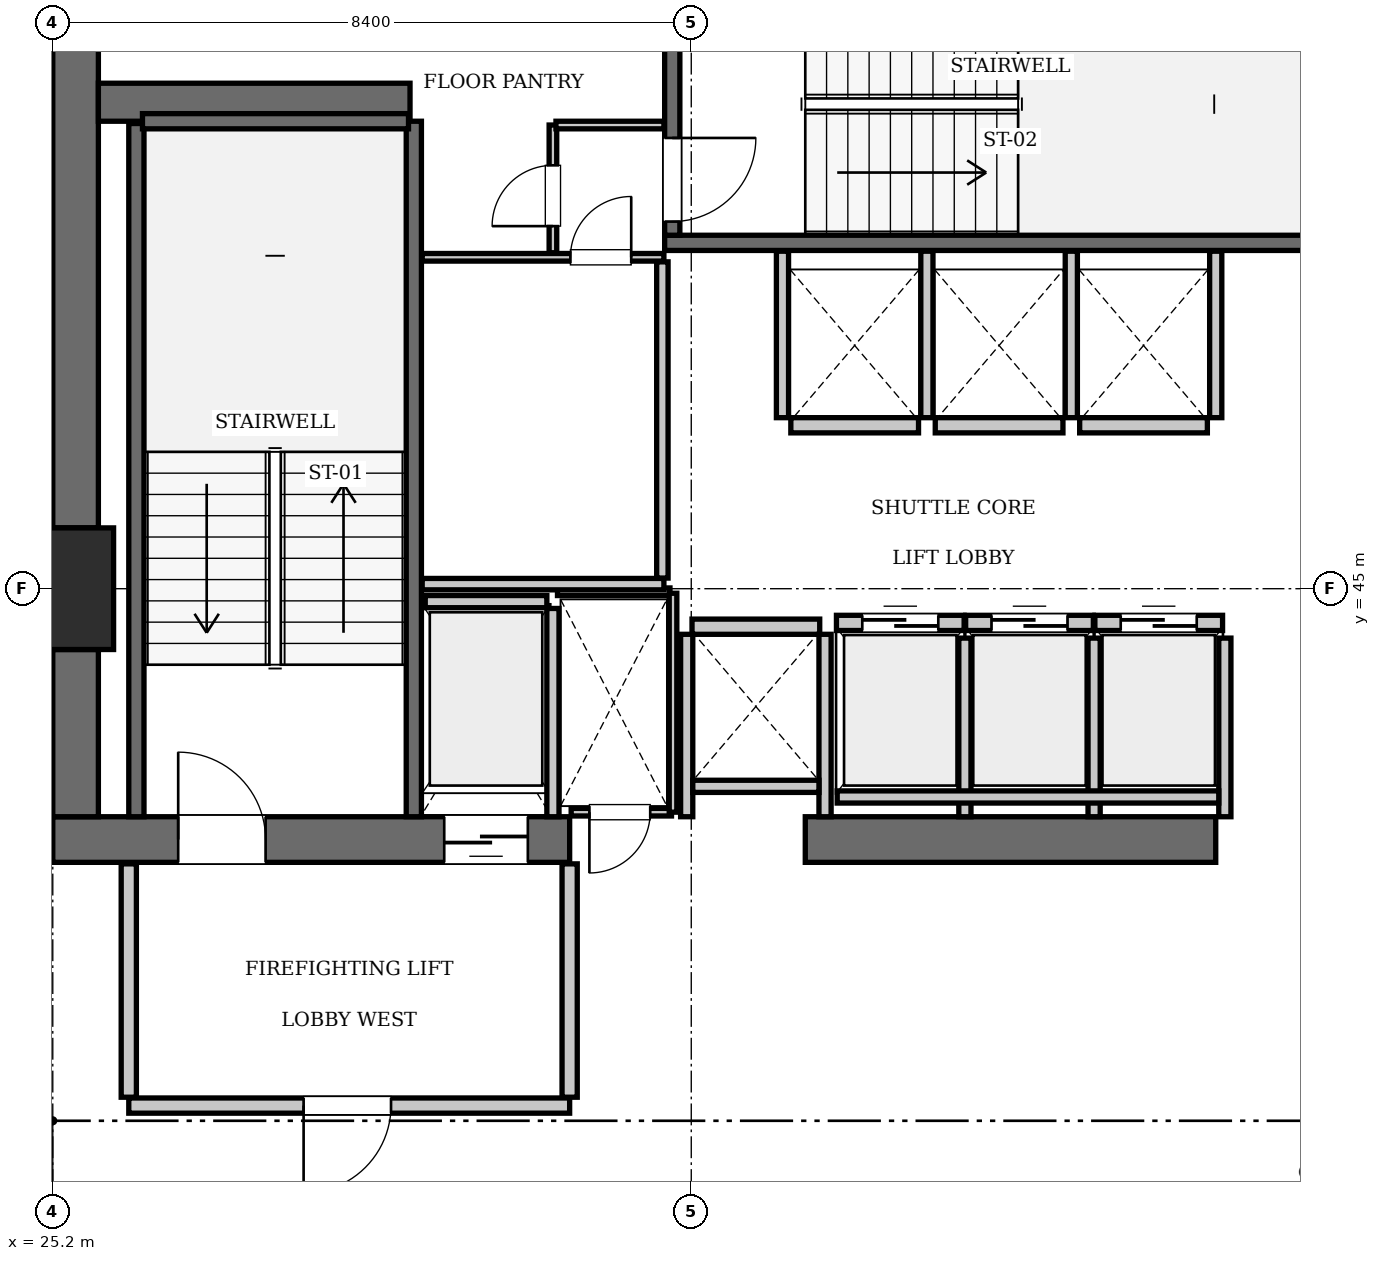
"""IFC4 building model, lengths in metres.
Left out: names, types, materials, properties, quantities, classifications, styles, units other than length and angle.
Written with IfcOpenShell. Run it as: python <this file> out.ifc"""

import sys

from ifc_helpers import new_model, si_unit, direction, frame, frame_2d, origin, origin_2d, place, context, subcontext, project, spatial, rectangle, extrude, element, fill, save


model = new_model("IFC4")
c1 = context("Model", 3, precision=1e-05, world=origin(), true_north=direction((0.0, 1.0)))
c2 = subcontext(c1, "Body", "Model", "MODEL_VIEW")
j1 = project(units=[si_unit("LENGTHUNIT", "METRE"), si_unit("PLANEANGLEUNIT", "RADIAN")], contexts=[c1])
p1 = place(None, origin())
s1 = spatial("IfcSite", under=j1, at=p1, CompositionType="ELEMENT")
p2 = place(p1, origin())
s2 = spatial("IfcBuilding", under=s1, at=p2, CompositionType="ELEMENT")
p3 = place(p2, frame((0.0, 0.0, 285.6)))
s3 = spatial("IfcBuildingStorey", under=s2, at=p3, CompositionType="ELEMENT", Elevation=285.6)
p4 = place(p3, frame((25.2, 45.0, 0.0), z_axis=(0.0, 0.0, 1.0), x_axis=(1.0, 0.0, 0.0)))
e1 = element("IfcColumn", 1, at=p4, inside=s3, PredefinedType="COLUMN", context=c2, shape_type="SweptSolid", body=[
    extrude(rectangle(XDim=1.6, YDim=1.6, at=origin_2d()), origin(), (0.0, 0.0, 1.0), 3.85),
])
p5 = place(p3, frame((25.2, 41.7, 0.0), z_axis=(0.0, 0.0, 1.0), x_axis=(1.0, 0.0, 0.0)))
e2 = element("IfcWall", 2, at=p5, inside=s3, PredefinedType="SHEAR", context=c2, shape_type="SweptSolid", body=[
    extrude(rectangle(XDim=6.8, YDim=0.6, at=frame_2d((3.4, 0.0))), origin(), (0.0, 0.0, 1.0), 3.85),
])
p6 = place(p5, frame((1.65, 0.0, 0.0)))
e3 = element("IfcOpeningElement", 3, at=p6, cuts=e2, PredefinedType="OPENING", context=c2, shape_type="SweptSolid", body=[
    extrude(rectangle(XDim=1.15, YDim=2.15, at=frame_2d((0.575, 1.075))), frame((0.0, 0.31, 0.0), z_axis=(0.0, -1.0, 0.0), x_axis=(1.0, 0.0, 0.0)), (0.0, 0.0, 1.0), 0.62),
])
p7 = place(p5, frame((5.15, 0.0, 0.0)))
e4 = element("IfcOpeningElement", 4, at=p7, cuts=e2, PredefinedType="OPENING", context=c2, shape_type="SweptSolid", body=[
    extrude(rectangle(XDim=1.1, YDim=2.2, at=frame_2d((0.55, 1.1))), frame((0.0, 0.31, 0.0), z_axis=(0.0, -1.0, 0.0), x_axis=(1.0, 0.0, 0.0)), (0.0, 0.0, 1.0), 0.62),
])
p8 = place(p3, frame((35.1, 41.7, 0.0), z_axis=(0.0, 0.0, 1.0), x_axis=(1.0, 0.0, 0.0)))
e5 = element("IfcWall", 5, at=p8, inside=s3, PredefinedType="SHEAR", context=c2, shape_type="SweptSolid", body=[
    extrude(rectangle(XDim=5.4, YDim=0.6, at=frame_2d((2.7, 0.0))), origin(), (0.0, 0.0, 1.0), 3.85),
])
p9 = place(p3, frame((25.5, 42.0, 0.0), z_axis=(0.0, 0.0, 1.0), x_axis=(0.0, 1.0, 0.0)))
e6 = element("IfcWall", 6, at=p9, inside=s3, PredefinedType="SHEAR", context=c2, shape_type="SweptSolid", body=[
    extrude(rectangle(XDim=2.2, YDim=0.6, at=frame_2d((1.1, 0.0))), origin(), (0.0, 0.0, 1.0), 3.85),
])
p10 = place(p3, frame((25.5, 45.8, 0.0), z_axis=(0.0, 0.0, 1.0), x_axis=(0.0, 1.0, 0.0)))
e7 = element("IfcWall", 7, at=p10, inside=s3, PredefinedType="SHEAR", context=c2, shape_type="SweptSolid", body=[
    extrude(rectangle(XDim=7.6, YDim=0.6, at=frame_2d((3.8, 0.0))), origin(), (0.0, 0.0, 1.0), 3.85),
])
p11 = place(p3, frame((25.8, 51.4, 0.0), z_axis=(0.0, 0.0, 1.0), x_axis=(1.0, 0.0, 0.0)))
e8 = element("IfcWall", 8, at=p11, inside=s3, PredefinedType="SHEAR", context=c2, shape_type="SweptSolid", body=[
    extrude(rectangle(XDim=4.1, YDim=0.5, at=frame_2d((2.05, 0.0))), origin(), (0.0, 0.0, 1.0), 3.85),
])
p12 = place(p3, frame((29.95, 42.0, 0.0), z_axis=(0.0, 0.0, 1.0), x_axis=(0.0, 1.0, 0.0)))
e9 = element("IfcWall", 9, at=p12, inside=s3, PredefinedType="SOLIDWALL", context=c2, shape_type="SweptSolid", body=[
    extrude(rectangle(XDim=9.15, YDim=0.2, at=frame_2d((4.575, 0.0))), origin(), (0.0, 0.0, 1.0), 3.61),
])
p13 = place(p3, frame((26.3, 42.0, 0.0), z_axis=(0.0, 0.0, 1.0), x_axis=(0.0, 1.0, 0.0)))
e10 = element("IfcWall", 10, at=p13, inside=s3, PredefinedType="SOLIDWALL", context=c2, shape_type="SweptSolid", body=[
    extrude(rectangle(XDim=9.12, YDim=0.2, at=frame_2d((4.56, 0.0))), origin(), (0.0, 0.0, 1.0), 3.61),
])
p14 = place(p3, frame((26.38, 51.15, 0.0), z_axis=(0.0, 0.0, 1.0), x_axis=(1.0, 0.0, 0.0)))
e11 = element("IfcWall", 11, at=p14, inside=s3, PredefinedType="SOLIDWALL", context=c2, shape_type="SweptSolid", body=[
    extrude(rectangle(XDim=3.5, YDim=0.2, at=frame_2d((1.75, 0.0))), origin(), (0.0, 0.0, 1.0), 3.61),
])
p15 = place(p3, frame((33.25, 49.55, 0.0), z_axis=(0.0, 0.0, 1.0), x_axis=(1.0, 0.0, 0.0)))
e12 = element("IfcWall", 12, at=p15, inside=s3, PredefinedType="SOLIDWALL", context=c2, shape_type="SweptSolid", body=[
    extrude(rectangle(XDim=9.1, YDim=0.2, at=frame_2d((4.55, 0.0))), origin(), (0.0, 0.0, 1.0), 3.61),
])
p16 = place(p3, frame((33.35, 49.65, 0.0), z_axis=(0.0, 0.0, 1.0), x_axis=(0.0, 1.0, 0.0)))
e13 = element("IfcWall", 13, at=p16, inside=s3, PredefinedType="SOLIDWALL", context=c2, shape_type="SweptSolid", body=[
    extrude(rectangle(XDim=3.75, YDim=0.2, at=frame_2d((1.875, 0.0))), origin(), (0.0, 0.0, 1.0), 3.61),
])
p17 = place(p16, frame((0.18, 0.0, 0.0)))
e14 = element("IfcOpeningElement", 14, at=p17, cuts=e13, PredefinedType="OPENING", context=c2, shape_type="SweptSolid", body=[
    extrude(rectangle(XDim=1.1, YDim=2.15, at=frame_2d((0.55, 1.075))), frame((0.0, 0.11, 0.0), z_axis=(0.0, -1.0, 0.0), x_axis=(1.0, 0.0, 0.0)), (0.0, 0.0, 1.0), 0.22),
])
p18 = place(p3, frame((35.51, 44.55, 0.0), z_axis=(0.0, 0.0, 1.0), x_axis=(1.0, 0.0, 0.0)))
e15 = element("IfcWall", 15, at=p18, inside=s3, PredefinedType="SOLIDWALL", context=c2, shape_type="SweptSolid", body=[
    extrude(rectangle(XDim=1.68, YDim=0.2, at=frame_2d((0.84, 0.0))), origin(), (0.0, 0.0, 1.0), 3.61),
])
p19 = place(p18, frame((0.34, 0.0, 0.0)))
e16 = element("IfcOpeningElement", 16, at=p19, cuts=e15, PredefinedType="OPENING", context=c2, shape_type="SweptSolid", body=[
    extrude(rectangle(XDim=1.0, YDim=2.15, at=frame_2d((0.5, 1.075))), frame((0.0, 0.11, 0.0), z_axis=(0.0, -1.0, 0.0), x_axis=(1.0, 0.0, 0.0)), (0.0, 0.0, 1.0), 0.22),
])
p20 = place(p3, frame((37.21, 44.55, 0.0), z_axis=(0.0, 0.0, 1.0), x_axis=(1.0, 0.0, 0.0)))
e17 = element("IfcWall", 17, at=p20, inside=s3, PredefinedType="SOLIDWALL", context=c2, shape_type="SweptSolid", body=[
    extrude(rectangle(XDim=1.68, YDim=0.2, at=frame_2d((0.84, 0.0))), origin(), (0.0, 0.0, 1.0), 3.61),
])
p21 = place(p20, frame((0.34, 0.0, 0.0)))
e18 = element("IfcOpeningElement", 18, at=p21, cuts=e17, PredefinedType="OPENING", context=c2, shape_type="SweptSolid", body=[
    extrude(rectangle(XDim=1.0, YDim=2.15, at=frame_2d((0.5, 1.075))), frame((0.0, 0.11, 0.0), z_axis=(0.0, -1.0, 0.0), x_axis=(1.0, 0.0, 0.0)), (0.0, 0.0, 1.0), 0.22),
])
p22 = place(p3, frame((38.91, 44.55, 0.0), z_axis=(0.0, 0.0, 1.0), x_axis=(1.0, 0.0, 0.0)))
e19 = element("IfcWall", 19, at=p22, inside=s3, PredefinedType="SOLIDWALL", context=c2, shape_type="SweptSolid", body=[
    extrude(rectangle(XDim=1.68, YDim=0.2, at=frame_2d((0.84, 0.0))), origin(), (0.0, 0.0, 1.0), 3.61),
])
p23 = place(p22, frame((0.34, 0.0, 0.0)))
e20 = element("IfcOpeningElement", 20, at=p23, cuts=e19, PredefinedType="OPENING", context=c2, shape_type="SweptSolid", body=[
    extrude(rectangle(XDim=1.0, YDim=2.15, at=frame_2d((0.5, 1.075))), frame((0.0, 0.11, 0.0), z_axis=(0.0, -1.0, 0.0), x_axis=(1.0, 0.0, 0.0)), (0.0, 0.0, 1.0), 0.22),
])
p24 = place(p3, frame((34.91, 47.15, 0.0), z_axis=(0.0, 0.0, 1.0), x_axis=(1.0, 0.0, 0.0)))
e21 = element("IfcWall", 21, at=p24, inside=s3, PredefinedType="SOLIDWALL", context=c2, shape_type="SweptSolid", body=[
    extrude(rectangle(XDim=1.68, YDim=0.2, at=frame_2d((0.84, 0.0))), origin(), (0.0, 0.0, 1.0), 3.61),
])
for number, where, z_axis, x_axis in (
    (22, (36.81, 47.15, 0.0), (0.0, 0.0, 1.0), (1.0, 0.0, 0.0)),
    (23, (38.71, 47.15, 0.0), (0.0, 0.0, 1.0), (1.0, 0.0, 0.0)),
    (24, (33.61, 44.5, 0.0), (0.0, 0.0, 1.0), (1.0, 0.0, 0.0)),
):
    element("IfcWall", number, at=place(p3, frame(where, z_axis=z_axis, x_axis=x_axis)), inside=s3, PredefinedType="SOLIDWALL", context=c2, shape_type="SweptSolid", body=[
        extrude(rectangle(XDim=1.68, YDim=0.2, at=frame_2d((0.84, 0.0))), origin(), (0.0, 0.0, 1.0), 3.61),
    ])
p25 = place(p3, frame((30.1, 44.83, 0.0), z_axis=(0.0, 0.0, 1.0), x_axis=(1.0, 0.0, 0.0)))
e25 = element("IfcWall", 25, at=p25, inside=s3, PredefinedType="SOLIDWALL", context=c2, shape_type="SweptSolid", body=[
    extrude(rectangle(XDim=1.6, YDim=0.16, at=frame_2d((0.8, 0.0))), origin(), (0.0, 0.0, 1.0), 3.61),
])
p26 = place(p3, frame((31.78, 42.0, 0.0), z_axis=(0.0, 0.0, 1.0), x_axis=(0.0, 1.0, 0.0)))
e26 = element("IfcWall", 26, at=p26, inside=s3, PredefinedType="SOLIDWALL", context=c2, shape_type="SweptSolid", body=[
    extrude(rectangle(XDim=2.74, YDim=0.16, at=frame_2d((1.37, 0.0))), origin(), (0.0, 0.0, 1.0), 3.61),
])
for number, where, z_axis, x_axis in (
    (27, (37.2, 42.0, 0.0), (0.0, 0.0, 1.0), (0.0, 1.0, 0.0)),
    (28, (38.9, 42.0, 0.0), (0.0, 0.0, 1.0), (0.0, 1.0, 0.0)),
    (29, (40.62, 42.0, 0.0), (0.0, 0.0, 1.0), (0.0, 1.0, 0.0)),
):
    element("IfcWall", number, at=place(p3, frame(where, z_axis=z_axis, x_axis=x_axis)), inside=s3, PredefinedType="SOLIDWALL", context=c2, shape_type="SweptSolid", body=[
        extrude(rectangle(XDim=2.35, YDim=0.16, at=frame_2d((1.175, 0.0))), origin(), (0.0, 0.0, 1.0), 3.61),
    ])
p27 = place(p3, frame((35.52, 42.26, 0.0), z_axis=(0.0, 0.0, 1.0), x_axis=(1.0, 0.0, 0.0)))
e30 = element("IfcWall", 30, at=p27, inside=s3, PredefinedType="SOLIDWALL", context=c2, shape_type="SweptSolid", body=[
    extrude(rectangle(XDim=5.02, YDim=0.16, at=frame_2d((2.51, 0.0))), origin(), (0.0, 0.0, 1.0), 3.61),
])
for number, where, z_axis, x_axis in (
    (31, (34.8, 47.25, 0.0), (0.0, 0.0, 1.0), (0.0, 1.0, 0.0)),
    (32, (36.7, 47.25, 0.0), (0.0, 0.0, 1.0), (0.0, 1.0, 0.0)),
    (33, (38.6, 47.25, 0.0), (0.0, 0.0, 1.0), (0.0, 1.0, 0.0)),
    (34, (40.5, 47.25, 0.0), (0.0, 0.0, 1.0), (0.0, 1.0, 0.0)),
):
    element("IfcWall", number, at=place(p3, frame(where, z_axis=z_axis, x_axis=x_axis)), inside=s3, PredefinedType="SOLIDWALL", context=c2, shape_type="SweptSolid", body=[
        extrude(rectangle(XDim=2.19, YDim=0.16, at=frame_2d((1.095, 0.0))), origin(), (0.0, 0.0, 1.0), 3.61),
    ])
for number, where, z_axis, x_axis in (
    (35, (33.54, 42.0, 0.0), (0.0, 0.0, 1.0), (0.0, 1.0, 0.0)),
    (36, (35.36, 42.0, 0.0), (0.0, 0.0, 1.0), (0.0, 1.0, 0.0)),
):
    element("IfcWall", number, at=place(p3, frame(where, z_axis=z_axis, x_axis=x_axis)), inside=s3, PredefinedType="SOLIDWALL", context=c2, shape_type="SweptSolid", body=[
        extrude(rectangle(XDim=2.4, YDim=0.16, at=frame_2d((1.2, 0.0))), origin(), (0.0, 0.0, 1.0), 3.61),
    ])
p28 = place(p3, frame((33.62, 42.4, 0.0), z_axis=(0.0, 0.0, 1.0), x_axis=(1.0, 0.0, 0.0)))
e37 = element("IfcWall", 37, at=p28, inside=s3, PredefinedType="SOLIDWALL", context=c2, shape_type="SweptSolid", body=[
    extrude(rectangle(XDim=1.66, YDim=0.16, at=frame_2d((0.83, 0.0))), origin(), (0.0, 0.0, 1.0), 3.61),
])
p29 = place(p3, frame((26.2, 38.2, 0.0), z_axis=(0.0, 0.0, 1.0), x_axis=(1.0, 0.0, 0.0)))
e38 = element("IfcWall", 38, at=p29, inside=s3, PredefinedType="PARTITIONING", context=c2, shape_type="SweptSolid", body=[
    extrude(rectangle(XDim=5.8, YDim=0.2, at=frame_2d((2.9, 0.0))), origin(), (0.0, 0.0, 1.0), 3.61),
])
p30 = place(p29, frame((2.3, 0.0, 0.0)))
e39 = element("IfcOpeningElement", 39, at=p30, cuts=e38, PredefinedType="OPENING", context=c2, shape_type="SweptSolid", body=[
    extrude(rectangle(XDim=1.15, YDim=2.15, at=frame_2d((0.575, 1.075))), frame((0.0, 0.11, 0.0), z_axis=(0.0, -1.0, 0.0), x_axis=(1.0, 0.0, 0.0)), (0.0, 0.0, 1.0), 0.22),
])
for number, where, z_axis, x_axis in (
    (40, (26.2, 38.31, 0.0), (0.0, 0.0, 1.0), (0.0, 1.0, 0.0)),
    (41, (32.0, 38.31, 0.0), (0.0, 0.0, 1.0), (0.0, 1.0, 0.0)),
):
    element("IfcWall", number, at=place(p3, frame(where, z_axis=z_axis, x_axis=x_axis)), inside=s3, PredefinedType="PARTITIONING", context=c2, shape_type="SweptSolid", body=[
        extrude(rectangle(XDim=3.07, YDim=0.2, at=frame_2d((1.535, 0.0))), origin(), (0.0, 0.0, 1.0), 3.61),
    ])
p31 = place(p3, frame((32.02, 42.06, 0.0), z_axis=(0.0, 0.0, 1.0), x_axis=(1.0, 0.0, 0.0)))
e42 = element("IfcWall", 42, at=p31, inside=s3, PredefinedType="PARTITIONING", context=c2, shape_type="SweptSolid", body=[
    extrude(rectangle(XDim=1.32, YDim=0.1, at=frame_2d((0.66, 0.0))), origin(), (0.0, 0.0, 1.0), 3.61),
])
p32 = place(p31, frame((0.24, 0.0, 0.0)))
e43 = element("IfcOpeningElement", 43, at=p32, cuts=e42, PredefinedType="OPENING", context=c2, shape_type="SweptSolid", body=[
    extrude(rectangle(XDim=0.8, YDim=2.05, at=frame_2d((0.4, 1.025))), frame((0.0, 0.06, 0.0), z_axis=(0.0, -1.0, 0.0), x_axis=(1.0, 0.0, 0.0)), (0.0, 0.0, 1.0), 0.12),
])
p33 = place(p3, frame((31.84, 44.96, 0.0), z_axis=(0.0, 0.0, 1.0), x_axis=(1.0, 0.0, 0.0)))
e44 = element("IfcWall", 44, at=p33, inside=s3, PredefinedType="PARTITIONING", context=c2, shape_type="SweptSolid", body=[
    extrude(rectangle(XDim=1.48, YDim=0.1, at=frame_2d((0.74, 0.0))), origin(), (0.0, 0.0, 1.0), 3.61),
])
p34 = place(p3, frame((33.36, 42.06, 0.0), z_axis=(0.0, 0.0, 1.0), x_axis=(0.0, 1.0, 0.0)))
e45 = element("IfcWall", 45, at=p34, inside=s3, PredefinedType="PARTITIONING", context=c2, shape_type="SweptSolid", body=[
    extrude(rectangle(XDim=2.88, YDim=0.1, at=frame_2d((1.44, 0.0))), origin(), (0.0, 0.0, 1.0), 3.61),
])
p35 = place(p3, frame((30.06, 45.06, 0.0), z_axis=(0.0, 0.0, 1.0), x_axis=(1.0, 0.0, 0.0)))
e46 = element("IfcWall", 46, at=p35, inside=s3, PredefinedType="PARTITIONING", context=c2, shape_type="SweptSolid", body=[
    extrude(rectangle(XDim=3.18, YDim=0.15, at=frame_2d((1.59, 0.0))), origin(), (0.0, 0.0, 1.0), 3.61),
])
p36 = place(p3, frame((33.22, 45.14, 0.0), z_axis=(0.0, 0.0, 1.0), x_axis=(0.0, 1.0, 0.0)))
e47 = element("IfcWall", 47, at=p36, inside=s3, PredefinedType="PARTITIONING", context=c2, shape_type="SweptSolid", body=[
    extrude(rectangle(XDim=4.16, YDim=0.15, at=frame_2d((2.08, 0.0))), origin(), (0.0, 0.0, 1.0), 3.61),
])
p37 = place(p3, frame((30.06, 49.36, 0.0), z_axis=(0.0, 0.0, 1.0), x_axis=(1.0, 0.0, 0.0)))
e48 = element("IfcWall", 48, at=p37, inside=s3, PredefinedType="PARTITIONING", context=c2, shape_type="SweptSolid", body=[
    extrude(rectangle(XDim=3.18, YDim=0.1, at=frame_2d((1.59, 0.0))), origin(), (0.0, 0.0, 1.0), 3.61),
])
p38 = place(p37, frame((1.95, 0.0, 0.0)))
e49 = element("IfcOpeningElement", 49, at=p38, cuts=e48, PredefinedType="OPENING", context=c2, shape_type="SweptSolid", body=[
    extrude(rectangle(XDim=0.8, YDim=2.05, at=frame_2d((0.4, 1.025))), frame((0.0, 0.06, 0.0), z_axis=(0.0, -1.0, 0.0), x_axis=(1.0, 0.0, 0.0)), (0.0, 0.0, 1.0), 0.12),
])
p39 = place(p3, frame((31.78, 49.42, 0.0), z_axis=(0.0, 0.0, 1.0), x_axis=(0.0, 1.0, 0.0)))
e50 = element("IfcWall", 50, at=p39, inside=s3, PredefinedType="PARTITIONING", context=c2, shape_type="SweptSolid", body=[
    extrude(rectangle(XDim=1.68, YDim=0.1, at=frame_2d((0.84, 0.0))), origin(), (0.0, 0.0, 1.0), 3.61),
])
p40 = place(p39, frame((0.35, 0.0, 0.0)))
e51 = element("IfcOpeningElement", 51, at=p40, cuts=e50, PredefinedType="OPENING", context=c2, shape_type="SweptSolid", body=[
    extrude(rectangle(XDim=0.8, YDim=2.05, at=frame_2d((0.4, 1.025))), frame((0.0, 0.06, 0.0), z_axis=(0.0, -1.0, 0.0), x_axis=(1.0, 0.0, 0.0)), (0.0, 0.0, 1.0), 0.12),
])
p41 = place(p3, frame((31.82, 51.1, 0.0), z_axis=(0.0, 0.0, 1.0), x_axis=(1.0, 0.0, 0.0)))
e52 = element("IfcWall", 52, at=p41, inside=s3, PredefinedType="PARTITIONING", context=c2, shape_type="SweptSolid", body=[
    extrude(rectangle(XDim=1.42, YDim=0.1, at=frame_2d((0.71, 0.0))), origin(), (0.0, 0.0, 1.0), 3.61),
])
p42 = place(p6, origin())
e53 = element("IfcDoor", 53, at=p42, inside=s3, OperationType="SINGLE_SWING_LEFT", PredefinedType="DOOR", context=c2, shape_type="SweptSolid", body=[
    extrude(rectangle(XDim=1.15, YDim=2.15, at=frame_2d((0.575, 1.075))), frame((0.0, 0.025, 0.0), z_axis=(0.0, -1.0, 0.0), x_axis=(1.0, 0.0, 0.0)), (0.0, 0.0, 1.0), 0.05),
])
fill(e3, e53)
p43 = place(p17, frame((1.1, 0.0, 0.0), z_axis=(0.0, 0.0, 1.0), x_axis=(-1.0, 0.0, 0.0)))
e54 = element("IfcDoor", 54, at=p43, inside=s3, OperationType="SINGLE_SWING_LEFT", PredefinedType="DOOR", context=c2, shape_type="SweptSolid", body=[
    extrude(rectangle(XDim=1.1, YDim=2.15, at=frame_2d((0.55, 1.075))), frame((0.0, 0.025, 0.0), z_axis=(0.0, -1.0, 0.0), x_axis=(1.0, 0.0, 0.0)), (0.0, 0.0, 1.0), 0.05),
])
fill(e14, e54)
p44 = place(p19, origin())
e55 = element("IfcDoor", 55, at=p44, inside=s3, OperationType="SLIDING_TO_LEFT", PredefinedType="DOOR", context=c2, shape_type="SweptSolid", body=[
    extrude(rectangle(XDim=1.0, YDim=2.15, at=frame_2d((0.5, 1.075))), frame((0.0, 0.025, 0.0), z_axis=(0.0, -1.0, 0.0), x_axis=(1.0, 0.0, 0.0)), (0.0, 0.0, 1.0), 0.05),
])
fill(e16, e55)
p45 = place(p21, origin())
e56 = element("IfcDoor", 56, at=p45, inside=s3, OperationType="SLIDING_TO_LEFT", PredefinedType="DOOR", context=c2, shape_type="SweptSolid", body=[
    extrude(rectangle(XDim=1.0, YDim=2.15, at=frame_2d((0.5, 1.075))), frame((0.0, 0.025, 0.0), z_axis=(0.0, -1.0, 0.0), x_axis=(1.0, 0.0, 0.0)), (0.0, 0.0, 1.0), 0.05),
])
fill(e18, e56)
p46 = place(p23, origin())
e57 = element("IfcDoor", 57, at=p46, inside=s3, OperationType="SLIDING_TO_LEFT", PredefinedType="DOOR", context=c2, shape_type="SweptSolid", body=[
    extrude(rectangle(XDim=1.0, YDim=2.15, at=frame_2d((0.5, 1.075))), frame((0.0, 0.025, 0.0), z_axis=(0.0, -1.0, 0.0), x_axis=(1.0, 0.0, 0.0)), (0.0, 0.0, 1.0), 0.05),
])
fill(e20, e57)
p47 = place(p7, frame((1.1, 0.0, 0.0), z_axis=(0.0, 0.0, 1.0), x_axis=(-1.0, 0.0, 0.0)))
e58 = element("IfcDoor", 58, at=p47, inside=s3, OperationType="SLIDING_TO_LEFT", PredefinedType="DOOR", context=c2, shape_type="SweptSolid", body=[
    extrude(rectangle(XDim=1.1, YDim=2.2, at=frame_2d((0.55, 1.1))), frame((0.0, 0.025, 0.0), z_axis=(0.0, -1.0, 0.0), x_axis=(1.0, 0.0, 0.0)), (0.0, 0.0, 1.0), 0.05),
])
fill(e4, e58)
p48 = place(p30, frame((1.15, 0.0, 0.0), z_axis=(0.0, 0.0, 1.0), x_axis=(-1.0, 0.0, 0.0)))
e59 = element("IfcDoor", 59, at=p48, inside=s3, OperationType="SINGLE_SWING_RIGHT", PredefinedType="DOOR", context=c2, shape_type="SweptSolid", body=[
    extrude(rectangle(XDim=1.15, YDim=2.15, at=frame_2d((0.575, 1.075))), frame((0.0, 0.025, 0.0), z_axis=(0.0, -1.0, 0.0), x_axis=(1.0, 0.0, 0.0)), (0.0, 0.0, 1.0), 0.05),
])
fill(e39, e59)
p49 = place(p32, frame((0.8, 0.0, 0.0), z_axis=(0.0, 0.0, 1.0), x_axis=(-1.0, 0.0, 0.0)))
e60 = element("IfcDoor", 60, at=p49, inside=s3, OperationType="SINGLE_SWING_RIGHT", PredefinedType="DOOR", context=c2, shape_type="SweptSolid", body=[
    extrude(rectangle(XDim=0.8, YDim=2.05, at=frame_2d((0.4, 1.025))), frame((0.0, 0.025, 0.0), z_axis=(0.0, -1.0, 0.0), x_axis=(1.0, 0.0, 0.0)), (0.0, 0.0, 1.0), 0.05),
])
fill(e43, e60)
p50 = place(p38, origin())
e61 = element("IfcDoor", 61, at=p50, inside=s3, OperationType="SINGLE_SWING_RIGHT", PredefinedType="DOOR", context=c2, shape_type="SweptSolid", body=[
    extrude(rectangle(XDim=0.8, YDim=2.05, at=frame_2d((0.4, 1.025))), frame((0.0, 0.025, 0.0), z_axis=(0.0, -1.0, 0.0), x_axis=(1.0, 0.0, 0.0)), (0.0, 0.0, 1.0), 0.05),
])
fill(e49, e61)
p51 = place(p40, origin())
e62 = element("IfcDoor", 62, at=p51, inside=s3, OperationType="SINGLE_SWING_LEFT", PredefinedType="DOOR", context=c2, shape_type="SweptSolid", body=[
    extrude(rectangle(XDim=0.8, YDim=2.05, at=frame_2d((0.4, 1.025))), frame((0.0, 0.025, 0.0), z_axis=(0.0, -1.0, 0.0), x_axis=(1.0, 0.0, 0.0)), (0.0, 0.0, 1.0), 0.05),
])
fill(e51, e62)
save(model, sys.argv[1])
